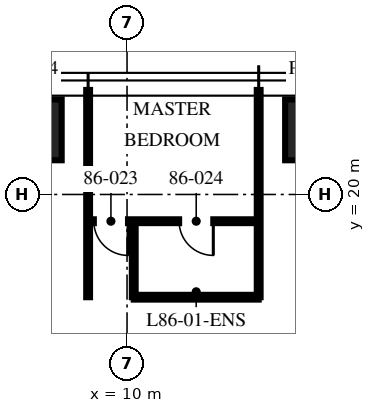
"""IFC4 building model, lengths in metres.
Left out: names, types, materials, properties, quantities, classifications, styles, units other than length and angle.
Written with IfcOpenShell. Run it as: python <this file> out.ifc"""

import sys

from ifc_helpers import new_model, si_unit, direction, frame, frame_2d, origin, origin_2d, place, context, subcontext, project, spatial, rectangle, extrude, element, fill, save


model = new_model("IFC4")
c1 = context("Model", 3, precision=1e-05, world=origin(), true_north=direction((0.0, 1.0)))
c2 = subcontext(c1, "Body", "Model", "MODEL_VIEW")
j1 = project(units=[si_unit("LENGTHUNIT", "METRE"), si_unit("PLANEANGLEUNIT", "RADIAN")], contexts=[c1])
p1 = place(None, origin())
s1 = spatial("IfcSite", under=j1, at=p1, CompositionType="ELEMENT")
p2 = place(p1, origin())
s2 = spatial("IfcBuilding", under=s1, at=p2, CompositionType="ELEMENT")
p3 = place(p2, frame((0.0, 0.0, 342.0)))
s3 = spatial("IfcBuildingStorey", under=s2, at=p3, CompositionType="ELEMENT", Elevation=342.0)
for number, where, z_axis, x_axis in (
    (1, (7.48, 21.7, 0.0), (0.0, 0.0, 1.0), (1.0, 0.0, 0.0)),
    (2, (14.96, 21.7, 0.0), (0.0, 0.0, 1.0), (1.0, 0.0, 0.0)),
):
    element("IfcColumn", number, at=place(p3, frame(where, z_axis=z_axis, x_axis=x_axis)), inside=s3, PredefinedType="COLUMN", context=c2, shape_type="SweptSolid", body=[
        extrude(rectangle(XDim=1.6, YDim=1.6, at=origin_2d()), origin(), (0.0, 0.0, 1.0), 3.75),
    ])
for number, where, z_axis, x_axis in (
    (3, (13.464, 17.296, 0.0), (0.0, 0.0, 1.0), (0.0, 1.0, 0.0)),
    (4, (8.976, 17.296, 0.0), (0.0, 0.0, 1.0), (0.0, 1.0, 0.0)),
):
    element("IfcWall", number, at=place(p3, frame(where, z_axis=z_axis, x_axis=x_axis)), inside=s3, PredefinedType="PARTITIONING", context=c2, shape_type="SweptSolid", body=[
        extrude(rectangle(XDim=5.454, YDim=0.1, at=frame_2d((2.727, 0.0))), origin(), (0.0, 0.0, 1.0), 3.01),
    ])
p4 = place(p3, frame((13.464, 19.296, 0.0), z_axis=(0.0, 0.0, 1.0), x_axis=(-1.0, 0.0, 0.0)))
e5 = element("IfcWall", 5, at=p4, inside=s3, PredefinedType="PARTITIONING", context=c2, shape_type="SweptSolid", body=[
    extrude(rectangle(XDim=4.488, YDim=0.1, at=frame_2d((2.244, 0.0))), origin(), (0.0, 0.0, 1.0), 2.91),
])
p5 = place(p4, frame((3.438, 0.0, 0.0)))
e6 = element("IfcOpeningElement", 6, at=p5, cuts=e5, PredefinedType="OPENING", context=c2, shape_type="SweptSolid", body=[
    extrude(rectangle(XDim=0.9, YDim=2.1, at=frame_2d((0.45, 1.05))), frame((0.0, 0.06, 0.0), z_axis=(0.0, -1.0, 0.0), x_axis=(1.0, 0.0, 0.0)), (0.0, 0.0, 1.0), 0.12),
])
p6 = place(p4, frame((1.194, 0.0, 0.0)))
e7 = element("IfcOpeningElement", 7, at=p6, cuts=e5, PredefinedType="OPENING", context=c2, shape_type="SweptSolid", body=[
    extrude(rectangle(XDim=0.9, YDim=2.1, at=frame_2d((0.45, 1.05))), frame((0.0, 0.06, 0.0), z_axis=(0.0, -1.0, 0.0), x_axis=(1.0, 0.0, 0.0)), (0.0, 0.0, 1.0), 0.12),
])
p7 = place(p3, frame((10.176, 17.296, 0.0), z_axis=(0.0, 0.0, 1.0), x_axis=(0.0, 1.0, 0.0)))
e8 = element("IfcWall", 8, at=p7, inside=s3, PredefinedType="PARTITIONING", context=c2, shape_type="SweptSolid", body=[
    extrude(rectangle(XDim=2.0, YDim=0.1, at=frame_2d((1.0, 0.0))), origin(), (0.0, 0.0, 1.0), 3.5),
])
p8 = place(p3, frame((13.464, 17.296, 0.0), z_axis=(0.0, 0.0, 1.0), x_axis=(-1.0, 0.0, 0.0)))
e9 = element("IfcWall", 9, at=p8, inside=s3, PredefinedType="PARTITIONING", context=c2, shape_type="SweptSolid", body=[
    extrude(rectangle(XDim=3.288, YDim=0.125, at=frame_2d((1.644, 0.0))), origin(), (0.0, 0.0, 1.0), 2.91),
])
p9 = place(p5, origin())
e10 = element("IfcDoor", 10, at=p9, inside=s3, OperationType="SINGLE_SWING_LEFT", PredefinedType="DOOR", context=c2, shape_type="SweptSolid", body=[
    extrude(rectangle(XDim=0.9, YDim=2.1, at=frame_2d((0.45, 1.05))), frame((0.0, 0.025, 0.0), z_axis=(0.0, -1.0, 0.0), x_axis=(1.0, 0.0, 0.0)), (0.0, 0.0, 1.0), 0.05),
])
fill(e6, e10)
p10 = place(p6, origin())
e11 = element("IfcDoor", 11, at=p10, inside=s3, OperationType="SINGLE_SWING_LEFT", PredefinedType="DOOR", context=c2, shape_type="SweptSolid", body=[
    extrude(rectangle(XDim=0.9, YDim=2.1, at=frame_2d((0.45, 1.05))), frame((0.0, 0.025, 0.0), z_axis=(0.0, -1.0, 0.0), x_axis=(1.0, 0.0, 0.0)), (0.0, 0.0, 1.0), 0.05),
])
fill(e7, e11)
save(model, sys.argv[1])
